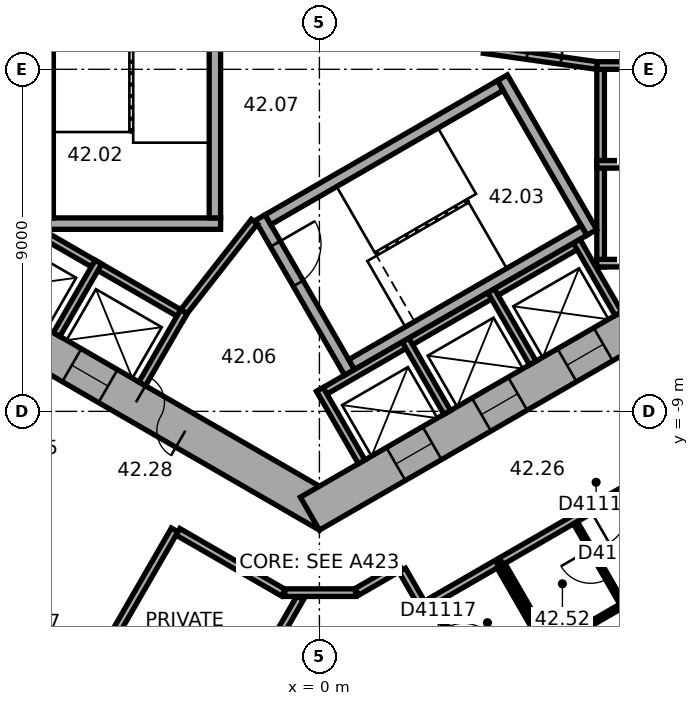
"""IFC4 building model, lengths in metres.
Left out: names, types, materials, properties, quantities, classifications, styles, units other than length and angle.
Written with IfcOpenShell. Run it as: python <this file> out.ifc"""

import sys

from ifc_helpers import new_model, si_unit, direction, frame, frame_2d, origin, place, context, subcontext, project, spatial, rectangle, extrude, element, fill, save


model = new_model("IFC4")
c1 = context("Model", 3, precision=1e-05, world=origin(), true_north=direction((0.0, 1.0)))
c2 = subcontext(c1, "Body", "Model", "MODEL_VIEW")
j1 = project(units=[si_unit("LENGTHUNIT", "METRE"), si_unit("PLANEANGLEUNIT", "RADIAN")], contexts=[c1])
p1 = place(None, origin())
s1 = spatial("IfcSite", under=j1, at=p1, CompositionType="ELEMENT")
p2 = place(p1, origin())
s2 = spatial("IfcBuilding", under=s1, at=p2, CompositionType="ELEMENT")
p3 = place(p2, frame((0.0, 0.0, 172.5)))
s3 = spatial("IfcBuildingStorey", under=s2, at=p3, CompositionType="ELEMENT", Elevation=172.5)
p4 = place(p3, frame((-10.25, -5.629, 0.0), z_axis=(0.0, 0.0, 1.0), x_axis=(0.866022616891, -0.50000482701, 0.0)))
e1 = element("IfcWall", 1, at=p4, inside=s3, PredefinedType="SHEAR", context=c2, shape_type="SweptSolid", body=[
    extrude(rectangle(XDim=12.125, YDim=1.0, at=frame_2d((6.062, 0.0))), origin(), (0.0, 0.0, 1.0), 3.7),
])
p5 = place(p4, frame((6.262, 0.0, 0.0)))
e2 = element("IfcOpeningElement", 2, at=p5, cuts=e1, PredefinedType="OPENING", context=c2, shape_type="SweptSolid", body=[
    extrude(rectangle(XDim=1.5, YDim=2.1, at=frame_2d((0.75, 1.05))), frame((0.0, 0.51, 0.0), z_axis=(0.0, -1.0, 0.0), x_axis=(1.0, 0.0, 0.0)), (0.0, 0.0, 1.0), 1.02),
])
p6 = place(p4, frame((1.712, 0.0, 0.0)))
e3 = element("IfcOpeningElement", 3, at=p6, cuts=e1, PredefinedType="OPENING", context=c2, shape_type="SweptSolid", body=[
    extrude(rectangle(XDim=1.1, YDim=2.1, at=frame_2d((0.55, 1.05))), frame((0.0, 0.51, 0.0), z_axis=(0.0, -1.0, 0.0), x_axis=(1.0, 0.0, 0.0)), (0.0, 0.0, 1.0), 1.02),
])
p7 = place(p4, frame((4.312, 0.0, 0.0)))
e4 = element("IfcOpeningElement", 4, at=p7, cuts=e1, PredefinedType="OPENING", context=c2, shape_type="SweptSolid", body=[
    extrude(rectangle(XDim=1.1, YDim=2.1, at=frame_2d((0.55, 1.05))), frame((0.0, 0.51, 0.0), z_axis=(0.0, -1.0, 0.0), x_axis=(1.0, 0.0, 0.0)), (0.0, 0.0, 1.0), 1.02),
])
p8 = place(p3, frame((-0.25, -11.691, 0.0), z_axis=(0.0, 0.0, 1.0), x_axis=(0.866022616891, 0.50000482701, 0.0)))
e5 = element("IfcWall", 5, at=p8, inside=s3, PredefinedType="SHEAR", context=c2, shape_type="SweptSolid", body=[
    extrude(rectangle(XDim=12.125, YDim=1.0, at=frame_2d((6.062, 0.0))), origin(), (0.0, 0.0, 1.0), 3.7),
])
p9 = place(p8, frame((2.612, 0.0, 0.0)))
e6 = element("IfcOpeningElement", 6, at=p9, cuts=e5, PredefinedType="OPENING", context=c2, shape_type="SweptSolid", body=[
    extrude(rectangle(XDim=1.1, YDim=2.1, at=frame_2d((0.55, 1.05))), frame((0.0, 0.51, 0.0), z_axis=(0.0, -1.0, 0.0), x_axis=(1.0, 0.0, 0.0)), (0.0, 0.0, 1.0), 1.02),
])
p10 = place(p8, frame((5.212, 0.0, 0.0)))
e7 = element("IfcOpeningElement", 7, at=p10, cuts=e5, PredefinedType="OPENING", context=c2, shape_type="SweptSolid", body=[
    extrude(rectangle(XDim=1.1, YDim=2.1, at=frame_2d((0.55, 1.05))), frame((0.0, 0.51, 0.0), z_axis=(0.0, -1.0, 0.0), x_axis=(1.0, 0.0, 0.0)), (0.0, 0.0, 1.0), 1.02),
])
p11 = place(p8, frame((7.812, 0.0, 0.0)))
e8 = element("IfcOpeningElement", 8, at=p11, cuts=e5, PredefinedType="OPENING", context=c2, shape_type="SweptSolid", body=[
    extrude(rectangle(XDim=1.1, YDim=2.1, at=frame_2d((0.55, 1.05))), frame((0.0, 0.51, 0.0), z_axis=(0.0, -1.0, 0.0), x_axis=(1.0, 0.0, 0.0)), (0.0, 0.0, 1.0), 1.02),
])
p12 = place(p3, frame((-18.789, -14.267, 0.0), z_axis=(0.0, 0.0, 1.0), x_axis=(0.866023315909, -0.500003616288, 0.0)))
e9 = element("IfcWall", 9, at=p12, inside=s3, PredefinedType="STANDARD", context=c2, shape_type="SweptSolid", body=[
    extrude(rectangle(XDim=20.044, YDim=0.2, at=frame_2d((10.022, 0.0))), origin(), (0.0, 0.0, 1.0), 3.7),
])
p13 = place(p12, frame((1.314, 0.0, 0.9)))
e10 = element("IfcOpeningElement", 10, at=p13, cuts=e9, PredefinedType="OPENING", context=c2, shape_type="SweptSolid", body=[
    extrude(rectangle(XDim=2.4, YDim=2.0, at=frame_2d((1.2, 1.0))), frame((0.0, 0.11, 0.0), z_axis=(0.0, -1.0, 0.0), x_axis=(1.0, 0.0, 0.0)), (0.0, 0.0, 1.0), 0.22),
])
p14 = place(p12, frame((5.069, 0.0, 0.9)))
e11 = element("IfcOpeningElement", 11, at=p14, cuts=e9, PredefinedType="OPENING", context=c2, shape_type="SweptSolid", body=[
    extrude(rectangle(XDim=2.4, YDim=2.0, at=frame_2d((1.2, 1.0))), frame((0.0, 0.11, 0.0), z_axis=(0.0, -1.0, 0.0), x_axis=(1.0, 0.0, 0.0)), (0.0, 0.0, 1.0), 0.22),
])
p15 = place(p12, frame((8.823, 0.0, 0.9)))
e12 = element("IfcOpeningElement", 12, at=p15, cuts=e9, PredefinedType="OPENING", context=c2, shape_type="SweptSolid", body=[
    extrude(rectangle(XDim=2.4, YDim=2.0, at=frame_2d((1.2, 1.0))), frame((0.0, 0.11, 0.0), z_axis=(0.0, -1.0, 0.0), x_axis=(1.0, 0.0, 0.0)), (0.0, 0.0, 1.0), 0.22),
])
p16 = place(p12, frame((12.577, 0.0, 0.9)))
e13 = element("IfcOpeningElement", 13, at=p16, cuts=e9, PredefinedType="OPENING", context=c2, shape_type="SweptSolid", body=[
    extrude(rectangle(XDim=2.4, YDim=2.0, at=frame_2d((1.2, 1.0))), frame((0.0, 0.11, 0.0), z_axis=(0.0, -1.0, 0.0), x_axis=(1.0, 0.0, 0.0)), (0.0, 0.0, 1.0), 0.22),
])
p17 = place(p12, frame((16.331, 0.0, 0.9)))
e14 = element("IfcOpeningElement", 14, at=p17, cuts=e9, PredefinedType="OPENING", context=c2, shape_type="SweptSolid", body=[
    extrude(rectangle(XDim=2.4, YDim=2.0, at=frame_2d((1.2, 1.0))), frame((0.0, 0.11, 0.0), z_axis=(0.0, -1.0, 0.0), x_axis=(1.0, 0.0, 0.0)), (0.0, 0.0, 1.0), 0.22),
])
p18 = place(p3, frame((2.911, -24.156, 0.0), z_axis=(0.0, 0.0, 1.0), x_axis=(0.833882163564, 0.551942512668, 0.0)))
e15 = element("IfcWall", 15, at=p18, inside=s3, PredefinedType="STANDARD", context=c2, shape_type="SweptSolid", body=[
    extrude(rectangle(XDim=20.044, YDim=0.2, at=frame_2d((10.022, 0.0))), origin(), (0.0, 0.0, 1.0), 3.7),
])
p19 = place(p18, frame((1.313, 0.0, 0.9)))
e16 = element("IfcOpeningElement", 16, at=p19, cuts=e15, PredefinedType="OPENING", context=c2, shape_type="SweptSolid", body=[
    extrude(rectangle(XDim=2.4, YDim=2.0, at=frame_2d((1.2, 1.0))), frame((0.0, 0.11, 0.0), z_axis=(0.0, -1.0, 0.0), x_axis=(1.0, 0.0, 0.0)), (0.0, 0.0, 1.0), 0.22),
])
p20 = place(p18, frame((5.067, 0.0, 0.9)))
e17 = element("IfcOpeningElement", 17, at=p20, cuts=e15, PredefinedType="OPENING", context=c2, shape_type="SweptSolid", body=[
    extrude(rectangle(XDim=2.4, YDim=2.0, at=frame_2d((1.2, 1.0))), frame((0.0, 0.11, 0.0), z_axis=(0.0, -1.0, 0.0), x_axis=(1.0, 0.0, 0.0)), (0.0, 0.0, 1.0), 0.22),
])
p21 = place(p18, frame((8.821, 0.0, 0.9)))
e18 = element("IfcOpeningElement", 18, at=p21, cuts=e15, PredefinedType="OPENING", context=c2, shape_type="SweptSolid", body=[
    extrude(rectangle(XDim=2.4, YDim=2.0, at=frame_2d((1.2, 1.0))), frame((0.0, 0.11, 0.0), z_axis=(0.0, -1.0, 0.0), x_axis=(1.0, 0.0, 0.0)), (0.0, 0.0, 1.0), 0.22),
])
p22 = place(p18, frame((12.575, 0.0, 0.9)))
e19 = element("IfcOpeningElement", 19, at=p22, cuts=e15, PredefinedType="OPENING", context=c2, shape_type="SweptSolid", body=[
    extrude(rectangle(XDim=2.4, YDim=2.0, at=frame_2d((1.2, 1.0))), frame((0.0, 0.11, 0.0), z_axis=(0.0, -1.0, 0.0), x_axis=(1.0, 0.0, 0.0)), (0.0, 0.0, 1.0), 0.22),
])
p23 = place(p18, frame((16.329, 0.0, 0.9)))
e20 = element("IfcOpeningElement", 20, at=p23, cuts=e15, PredefinedType="OPENING", context=c2, shape_type="SweptSolid", body=[
    extrude(rectangle(XDim=2.4, YDim=2.0, at=frame_2d((1.2, 1.0))), frame((0.0, 0.11, 0.0), z_axis=(0.0, -1.0, 0.0), x_axis=(1.0, 0.0, 0.0)), (0.0, 0.0, 1.0), 0.22),
])
p24 = place(p3, frame((7.4, -5.2, 0.0), z_axis=(0.0, 0.0, 1.0), x_axis=(0.0, 1.0, 0.0)))
e21 = element("IfcWall", 21, at=p24, inside=s3, PredefinedType="PARTITIONING", context=c2, shape_type="SweptSolid", body=[
    extrude(rectangle(XDim=5.4, YDim=0.2, at=frame_2d((2.7, 0.0))), origin(), (0.0, 0.0, 1.0), 3.42),
])
for number, where, z_axis, x_axis in (
    (22, (7.3, -5.1, 0.0), (0.0, 0.0, 1.0), (1.0, 0.0, 0.0)),
    (23, (7.3, -2.5, 0.0), (0.0, 0.0, 1.0), (1.0, 0.0, 0.0)),
    (24, (7.3, 0.1, 0.0), (0.0, 0.0, 1.0), (1.0, 0.0, 0.0)),
):
    element("IfcWall", number, at=place(p3, frame(where, z_axis=z_axis, x_axis=x_axis)), inside=s3, PredefinedType="PARTITIONING", context=c2, shape_type="SweptSolid", body=[
        extrude(rectangle(XDim=2.2, YDim=0.2, at=frame_2d((1.1, 0.0))), origin(), (0.0, 0.0, 1.0), 3.42),
    ])
p25 = place(p3, frame((-8.203, -3.809, 0.0), z_axis=(0.0, 0.0, 1.0), x_axis=(0.866028230842, -0.499995103361, 0.0)))
e25 = element("IfcWall", 25, at=p25, inside=s3, PredefinedType="PARTITIONING", context=c2, shape_type="SweptSolid", body=[
    extrude(rectangle(XDim=5.4, YDim=0.2, at=frame_2d((2.7, 0.0))), origin(), (0.0, 0.0, 1.0), 3.42),
])
p26 = place(p3, frame((-5.815, -5.072, 0.0), z_axis=(0.0, 0.0, 1.0), x_axis=(-0.499946605688, -0.86605622881, 0.0)))
e26 = element("IfcWall", 26, at=p26, inside=s3, PredefinedType="PARTITIONING", context=c2, shape_type="SweptSolid", body=[
    extrude(rectangle(XDim=2.2, YDim=0.2, at=frame_2d((1.1, 0.0))), origin(), (0.0, 0.0, 1.0), 3.42),
])
p27 = place(p3, frame((-3.563, -6.372, 0.0), z_axis=(0.0, 0.0, 1.0), x_axis=(-0.499994660107, -0.866028486751, 0.0)))
e27 = element("IfcWall", 27, at=p27, inside=s3, PredefinedType="PARTITIONING", context=c2, shape_type="SweptSolid", body=[
    extrude(rectangle(XDim=2.2, YDim=0.2, at=frame_2d((1.1, 0.0))), origin(), (0.0, 0.0, 1.0), 3.42),
])
p28 = place(p3, frame((-0.024, -8.559, 0.0), z_axis=(0.0, 0.0, 1.0), x_axis=(0.866026010844, 0.49999894854, 0.0)))
e28 = element("IfcWall", 28, at=p28, inside=s3, PredefinedType="PARTITIONING", context=c2, shape_type="SweptSolid", body=[
    extrude(rectangle(XDim=8.0, YDim=0.2, at=frame_2d((4.0, 0.0))), origin(), (0.0, 0.0, 1.0), 3.42),
])
for number, where, z_axis, x_axis in (
    (29, (0.013, -8.422, 0.0), (0.0, 0.0, 1.0), (0.5, -0.866, 0.0)),
    (30, (2.264, -7.122, 0.0), (0.0, 0.0, 1.0), (0.5, -0.866, 0.0)),
    (31, (4.516, -5.822, 0.0), (0.0, 0.0, 1.0), (0.5, -0.866, 0.0)),
    (32, (6.768, -4.522, 0.0), (0.0, 0.0, 1.0), (0.5, -0.866, 0.0)),
):
    element("IfcWall", number, at=place(p3, frame(where, z_axis=z_axis, x_axis=x_axis)), inside=s3, PredefinedType="PARTITIONING", context=c2, shape_type="SweptSolid", body=[
        extrude(rectangle(XDim=2.2, YDim=0.2, at=frame_2d((1.1, 0.0))), origin(), (0.0, 0.0, 1.0), 3.42),
    ])
p29 = place(p3, frame((-2.6, -4.06, 0.0), z_axis=(0.0, 0.0, 1.0), x_axis=(-1.0, 0.0, 0.0)))
e33 = element("IfcWall", 33, at=p29, inside=s3, PredefinedType="SHEAR", context=c2, shape_type="SweptSolid", body=[
    extrude(rectangle(XDim=4.7, YDim=0.3, at=frame_2d((2.35, 0.0))), origin(), (0.0, 0.0, 1.0), 3.42),
])
for number, where, z_axis, x_axis in (
    (34, (-2.75, 3.15, 0.0), (0.0, 0.0, 1.0), (0.0, -1.0, 0.0)),
    (35, (-7.15, 3.15, 0.0), (0.0, 0.0, 1.0), (0.0, -1.0, 0.0)),
):
    element("IfcWall", number, at=place(p3, frame(where, z_axis=z_axis, x_axis=x_axis)), inside=s3, PredefinedType="SHEAR", context=c2, shape_type="SweptSolid", body=[
        extrude(rectangle(XDim=7.06, YDim=0.3, at=frame_2d((3.53, 0.0))), origin(), (0.0, 0.0, 1.0), 3.42),
    ])
p30 = place(p3, frame((-1.558, -3.902, 0.0), z_axis=(0.0, 0.0, 1.0), x_axis=(0.499977259774, -0.866038532462, 0.0)))
e36 = element("IfcWall", 36, at=p30, inside=s3, PredefinedType="SHEAR", context=c2, shape_type="SweptSolid", body=[
    extrude(rectangle(XDim=4.7, YDim=0.3, at=frame_2d((2.35, 0.0))), origin(), (0.0, 0.0, 1.0), 3.42),
])
p31 = place(p30, frame((0.8, 0.0, 0.0)))
e37 = element("IfcOpeningElement", 37, at=p31, cuts=e36, PredefinedType="OPENING", context=c2, shape_type="SweptSolid", body=[
    extrude(rectangle(XDim=1.2, YDim=2.1, at=frame_2d((0.6, 1.05))), frame((0.0, 0.16, 0.0), z_axis=(0.0, -1.0, 0.0), x_axis=(1.0, 0.0, 0.0)), (0.0, 0.0, 1.0), 0.32),
])
p32 = place(p3, frame((4.816, -0.222, 0.0), z_axis=(0.0, 0.0, 1.0), x_axis=(0.499977259774, -0.866038532462, 0.0)))
e38 = element("IfcWall", 38, at=p32, inside=s3, PredefinedType="SHEAR", context=c2, shape_type="SweptSolid", body=[
    extrude(rectangle(XDim=4.7, YDim=0.3, at=frame_2d((2.35, 0.0))), origin(), (0.0, 0.0, 1.0), 3.42),
])
for number, where, z_axis, x_axis in (
    (39, (-1.353, -3.957, 0.0), (0.0, 0.0, 1.0), (0.866, 0.5, 0.0)),
    (40, (0.847, -7.767, 0.0), (0.0, 0.0, 1.0), (0.866, 0.5, 0.0)),
):
    element("IfcWall", number, at=place(p3, frame(where, z_axis=z_axis, x_axis=x_axis)), inside=s3, PredefinedType="SHEAR", context=c2, shape_type="SweptSolid", body=[
        extrude(rectangle(XDim=7.06, YDim=0.3, at=frame_2d((3.53, 0.0))), origin(), (0.0, 0.0, 1.0), 3.42),
    ])
p33 = place(p3, frame((4.327, 0.521, 0.0), z_axis=(0.0, 0.0, 1.0), x_axis=(0.990124376366, -0.14019172346, 0.0)))
e41 = element("IfcWall", 41, at=p33, inside=s3, PredefinedType="PARTITIONING", context=c2, shape_type="SweptSolid", body=[
    extrude(rectangle(XDim=3.002, YDim=0.2, at=frame_2d((1.501, 0.0))), origin(), (0.0, 0.0, 1.0), 3.42),
])
p34 = place(p33, frame((1.15, 0.0, 0.0)))
e42 = element("IfcOpeningElement", 42, at=p34, cuts=e41, PredefinedType="OPENING", context=c2, shape_type="SweptSolid", body=[
    extrude(rectangle(XDim=0.9, YDim=2.1, at=frame_2d((0.45, 1.05))), frame((0.0, 0.11, 0.0), z_axis=(0.0, -1.0, 0.0), x_axis=(1.0, 0.0, 0.0)), (0.0, 0.0, 1.0), 0.22),
])
p35 = place(p3, frame((-1.712, -4.008, 0.0), z_axis=(0.0, 0.0, 1.0), x_axis=(-0.616549420702, -0.787316208287, 0.0)))
e43 = element("IfcWall", 43, at=p35, inside=s3, PredefinedType="PARTITIONING", context=c2, shape_type="SweptSolid", body=[
    extrude(rectangle(XDim=3.002, YDim=0.2, at=frame_2d((1.501, 0.0))), origin(), (0.0, 0.0, 1.0), 3.42),
])
p36 = place(p3, frame((-7.984, -19.351, 0.0), z_axis=(0.0, 0.0, 1.0), x_axis=(0.500010139422, 0.866019549707, 0.0)))
e44 = element("IfcWall", 44, at=p36, inside=s3, PredefinedType="PARTITIONING", context=c2, shape_type="SweptSolid", body=[
    extrude(rectangle(XDim=8.35, YDim=0.2, at=frame_2d((4.175, 0.0))), origin(), (0.0, 0.0, 1.0), 3.42),
])
p37 = place(p36, frame((3.675, 0.0, 0.0)))
e45 = element("IfcOpeningElement", 45, at=p37, cuts=e44, PredefinedType="OPENING", context=c2, shape_type="SweptSolid", body=[
    extrude(rectangle(XDim=1.0, YDim=2.1, at=frame_2d((0.5, 1.05))), frame((0.0, 0.11, 0.0), z_axis=(0.0, -1.0, 0.0), x_axis=(1.0, 0.0, 0.0)), (0.0, 0.0, 1.0), 0.22),
])
p38 = place(p3, frame((-4.732, -21.228, 0.0), z_axis=(0.0, 0.0, 1.0), x_axis=(0.500000843414, 0.866024916838, 0.0)))
e46 = element("IfcWall", 46, at=p38, inside=s3, PredefinedType="PARTITIONING", context=c2, shape_type="SweptSolid", body=[
    extrude(rectangle(XDim=8.452, YDim=0.2, at=frame_2d((4.226, 0.0))), origin(), (0.0, 0.0, 1.0), 3.42),
])
p39 = place(p3, frame((-3.722, -12.169, 0.0), z_axis=(0.0, 0.0, 1.0), x_axis=(0.866033163891, -0.499986558861, 0.0)))
e47 = element("IfcWall", 47, at=p39, inside=s3, PredefinedType="PARTITIONING", context=c2, shape_type="SweptSolid", body=[
    extrude(rectangle(XDim=3.201, YDim=0.2, at=frame_2d((1.6, 0.0))), origin(), (0.0, 0.0, 1.0), 3.42),
])
p40 = place(p3, frame((-0.91, -13.77, 0.0), z_axis=(0.0, 0.0, 1.0), x_axis=(1.0, 0.0, 0.0)))
e48 = element("IfcWall", 48, at=p40, inside=s3, PredefinedType="PARTITIONING", context=c2, shape_type="SweptSolid", body=[
    extrude(rectangle(XDim=1.86, YDim=0.2, at=frame_2d((0.93, 0.0))), origin(), (0.0, 0.0, 1.0), 3.42),
])
p41 = place(p3, frame((0.985, -13.75, 0.0), z_axis=(0.0, 0.0, 1.0), x_axis=(0.866028661061, 0.499994358189, 0.0)))
e49 = element("IfcWall", 49, at=p41, inside=s3, PredefinedType="PARTITIONING", context=c2, shape_type="SweptSolid", body=[
    extrude(rectangle(XDim=1.321, YDim=0.2, at=frame_2d((0.661, 0.0))), origin(), (0.0, 0.0, 1.0), 3.42),
])
p42 = place(p3, frame((2.179, -13.176, 0.0), z_axis=(0.0, 0.0, 1.0), x_axis=(0.499978356969, -0.866037899034, 0.0)))
e50 = element("IfcWall", 50, at=p42, inside=s3, PredefinedType="PARTITIONING", context=c2, shape_type="SweptSolid", body=[
    extrude(rectangle(XDim=1.101, YDim=0.2, at=frame_2d((0.551, 0.0))), origin(), (0.0, 0.0, 1.0), 3.42),
])
p43 = place(p3, frame((2.946, -14.004, 0.0), z_axis=(0.0, 0.0, 1.0), x_axis=(0.866041268327, 0.499972520799, 0.0)))
e51 = element("IfcWall", 51, at=p43, inside=s3, PredefinedType="PARTITIONING", context=c2, shape_type="SweptSolid", body=[
    extrude(rectangle(XDim=2.0, YDim=0.2, at=frame_2d((1.0, 0.0))), origin(), (0.0, 0.0, 1.0), 3.42),
])
p44 = place(p3, frame((4.146, -16.083, 0.0), z_axis=(0.0, 0.0, 1.0), x_axis=(-0.499952165731, 0.866053019151, 0.0)))
e52 = element("IfcWall", 52, at=p44, inside=s3, PredefinedType="PARTITIONING", context=c2, shape_type="SweptSolid", body=[
    extrude(rectangle(XDim=2.3, YDim=0.12, at=frame_2d((1.15, 0.0))), origin(), (0.0, 0.0, 1.0), 3.42),
])
p45 = place(p44, frame((0.7, 0.0, 0.0)))
e53 = element("IfcOpeningElement", 53, at=p45, cuts=e52, PredefinedType="OPENING", context=c2, shape_type="SweptSolid", body=[
    extrude(rectangle(XDim=0.9, YDim=2.1, at=frame_2d((0.45, 1.05))), frame((0.0, 0.07, 0.0), z_axis=(0.0, -1.0, 0.0), x_axis=(1.0, 0.0, 0.0)), (0.0, 0.0, 1.0), 0.14),
])
p46 = place(p3, frame((4.728, -13.091, 0.0), z_axis=(0.0, 0.0, 1.0), x_axis=(0.500031774688, -0.866007057882, 0.0)))
e54 = element("IfcWall", 54, at=p46, inside=s3, PredefinedType="PARTITIONING", context=c2, shape_type="SweptSolid", body=[
    extrude(rectangle(XDim=2.3, YDim=0.12, at=frame_2d((1.15, 0.0))), origin(), (0.0, 0.0, 1.0), 3.42),
])
p47 = place(p3, frame((4.782, -12.944, 0.0), z_axis=(0.0, 0.0, 1.0), x_axis=(0.866022506829, 0.50000501764, 0.0)))
e55 = element("IfcWall", 55, at=p47, inside=s3, PredefinedType="PARTITIONING", context=c2, shape_type="SweptSolid", body=[
    extrude(rectangle(XDim=6.432, YDim=0.2, at=frame_2d((3.216, 0.0))), origin(), (0.0, 0.0, 1.0), 3.42),
])
p48 = place(p47, frame((2.704, 0.0, 0.0)))
e56 = element("IfcOpeningElement", 56, at=p48, cuts=e55, PredefinedType="OPENING", context=c2, shape_type="SweptSolid", body=[
    extrude(rectangle(XDim=1.0, YDim=2.1, at=frame_2d((0.5, 1.05))), frame((0.0, 0.11, 0.0), z_axis=(0.0, -1.0, 0.0), x_axis=(1.0, 0.0, 0.0)), (0.0, 0.0, 1.0), 0.22),
])
p49 = place(p47, frame((4.795, 0.0, 0.0)))
e57 = element("IfcOpeningElement", 57, at=p49, cuts=e55, PredefinedType="OPENING", context=c2, shape_type="SweptSolid", body=[
    extrude(rectangle(XDim=1.0, YDim=2.1, at=frame_2d((0.5, 1.05))), frame((0.0, 0.11, 0.0), z_axis=(0.0, -1.0, 0.0), x_axis=(1.0, 0.0, 0.0)), (0.0, 0.0, 1.0), 0.22),
])
p50 = place(p3, frame((6.082, -15.196, 0.0), z_axis=(0.0, 0.0, 1.0), x_axis=(-0.500004234368, 0.866022959057, 0.0)))
e58 = element("IfcWall", 58, at=p50, inside=s3, PredefinedType="PARTITIONING", context=c2, shape_type="SweptSolid", body=[
    extrude(rectangle(XDim=2.5, YDim=0.12, at=frame_2d((1.25, 0.0))), origin(), (0.0, 0.0, 1.0), 3.42),
])
p51 = place(p3, frame((6.737, -11.931, 0.0), z_axis=(0.0, 0.0, 1.0), x_axis=(0.500004234368, -0.866022959057, 0.0)))
e59 = element("IfcWall", 59, at=p51, inside=s3, PredefinedType="PARTITIONING", context=c2, shape_type="SweptSolid", body=[
    extrude(rectangle(XDim=2.5, YDim=0.12, at=frame_2d((1.25, 0.0))), origin(), (0.0, 0.0, 1.0), 3.42),
])
p52 = place(p51, frame((0.8, 0.0, 0.0)))
e60 = element("IfcOpeningElement", 60, at=p52, cuts=e59, PredefinedType="OPENING", context=c2, shape_type="SweptSolid", body=[
    extrude(rectangle(XDim=0.9, YDim=2.1, at=frame_2d((0.45, 1.05))), frame((0.0, 0.07, 0.0), z_axis=(0.0, -1.0, 0.0), x_axis=(1.0, 0.0, 0.0)), (0.0, 0.0, 1.0), 0.14),
])
p53 = place(p3, frame((7.935, -14.126, 0.0), z_axis=(0.0, 0.0, 1.0), x_axis=(-0.866009661879, -0.500027264788, 0.0)))
e61 = element("IfcWall", 61, at=p53, inside=s3, PredefinedType="PARTITIONING", context=c2, shape_type="SweptSolid", body=[
    extrude(rectangle(XDim=2.08, YDim=0.12, at=frame_2d((1.04, 0.0))), origin(), (0.0, 0.0, 1.0), 3.42),
])
p54 = place(p5, origin())
e62 = element("IfcDoor", 62, at=p54, inside=s3, OperationType="DOUBLE_DOOR_SINGLE_SWING", PredefinedType="DOOR", context=c2, shape_type="SweptSolid", body=[
    extrude(rectangle(XDim=1.5, YDim=2.1, at=frame_2d((0.75, 1.05))), frame((0.0, 0.025, 0.0), z_axis=(0.0, -1.0, 0.0), x_axis=(1.0, 0.0, 0.0)), (0.0, 0.0, 1.0), 0.05),
])
fill(e2, e62)
p55 = place(p31, origin())
e63 = element("IfcDoor", 63, at=p55, inside=s3, OperationType="SINGLE_SWING_RIGHT", PredefinedType="DOOR", context=c2, shape_type="SweptSolid", body=[
    extrude(rectangle(XDim=1.2, YDim=2.1, at=frame_2d((0.6, 1.05))), frame((0.0, 0.025, 0.0), z_axis=(0.0, -1.0, 0.0), x_axis=(1.0, 0.0, 0.0)), (0.0, 0.0, 1.0), 0.05),
])
fill(e37, e63)
p56 = place(p34, origin())
e64 = element("IfcDoor", 64, at=p56, inside=s3, OperationType="SINGLE_SWING_LEFT", PredefinedType="DOOR", context=c2, shape_type="SweptSolid", body=[
    extrude(rectangle(XDim=0.9, YDim=2.1, at=frame_2d((0.45, 1.05))), frame((0.0, 0.025, 0.0), z_axis=(0.0, -1.0, 0.0), x_axis=(1.0, 0.0, 0.0)), (0.0, 0.0, 1.0), 0.05),
])
fill(e42, e64)
p57 = place(p7, origin())
e65 = element("IfcDoor", 65, at=p57, inside=s3, OperationType="DOUBLE_DOOR_SLIDING", PredefinedType="DOOR", context=c2, shape_type="SweptSolid", body=[
    extrude(rectangle(XDim=1.1, YDim=2.1, at=frame_2d((0.55, 1.05))), frame((0.0, 0.025, 0.0), z_axis=(0.0, -1.0, 0.0), x_axis=(1.0, 0.0, 0.0)), (0.0, 0.0, 1.0), 0.05),
])
fill(e4, e65)
p58 = place(p9, origin())
e66 = element("IfcDoor", 66, at=p58, inside=s3, OperationType="DOUBLE_DOOR_SLIDING", PredefinedType="DOOR", context=c2, shape_type="SweptSolid", body=[
    extrude(rectangle(XDim=1.1, YDim=2.1, at=frame_2d((0.55, 1.05))), frame((0.0, 0.025, 0.0), z_axis=(0.0, -1.0, 0.0), x_axis=(1.0, 0.0, 0.0)), (0.0, 0.0, 1.0), 0.05),
])
fill(e6, e66)
p59 = place(p10, origin())
e67 = element("IfcDoor", 67, at=p59, inside=s3, OperationType="DOUBLE_DOOR_SLIDING", PredefinedType="DOOR", context=c2, shape_type="SweptSolid", body=[
    extrude(rectangle(XDim=1.1, YDim=2.1, at=frame_2d((0.55, 1.05))), frame((0.0, 0.025, 0.0), z_axis=(0.0, -1.0, 0.0), x_axis=(1.0, 0.0, 0.0)), (0.0, 0.0, 1.0), 0.05),
])
fill(e7, e67)
p60 = place(p11, origin())
e68 = element("IfcDoor", 68, at=p60, inside=s3, OperationType="DOUBLE_DOOR_SLIDING", PredefinedType="DOOR", context=c2, shape_type="SweptSolid", body=[
    extrude(rectangle(XDim=1.1, YDim=2.1, at=frame_2d((0.55, 1.05))), frame((0.0, 0.025, 0.0), z_axis=(0.0, -1.0, 0.0), x_axis=(1.0, 0.0, 0.0)), (0.0, 0.0, 1.0), 0.05),
])
fill(e8, e68)
p61 = place(p48, origin())
e69 = element("IfcDoor", 69, at=p61, inside=s3, OperationType="SINGLE_SWING_LEFT", PredefinedType="DOOR", context=c2, shape_type="SweptSolid", body=[
    extrude(rectangle(XDim=1.0, YDim=2.1, at=frame_2d((0.5, 1.05))), frame((0.0, 0.025, 0.0), z_axis=(0.0, -1.0, 0.0), x_axis=(1.0, 0.0, 0.0)), (0.0, 0.0, 1.0), 0.05),
])
fill(e56, e69)
p62 = place(p52, origin())
e70 = element("IfcDoor", 70, at=p62, inside=s3, OperationType="SINGLE_SWING_LEFT", PredefinedType="DOOR", context=c2, shape_type="SweptSolid", body=[
    extrude(rectangle(XDim=0.9, YDim=2.1, at=frame_2d((0.45, 1.05))), frame((0.0, 0.025, 0.0), z_axis=(0.0, -1.0, 0.0), x_axis=(1.0, 0.0, 0.0)), (0.0, 0.0, 1.0), 0.05),
])
fill(e60, e70)
save(model, sys.argv[1])
